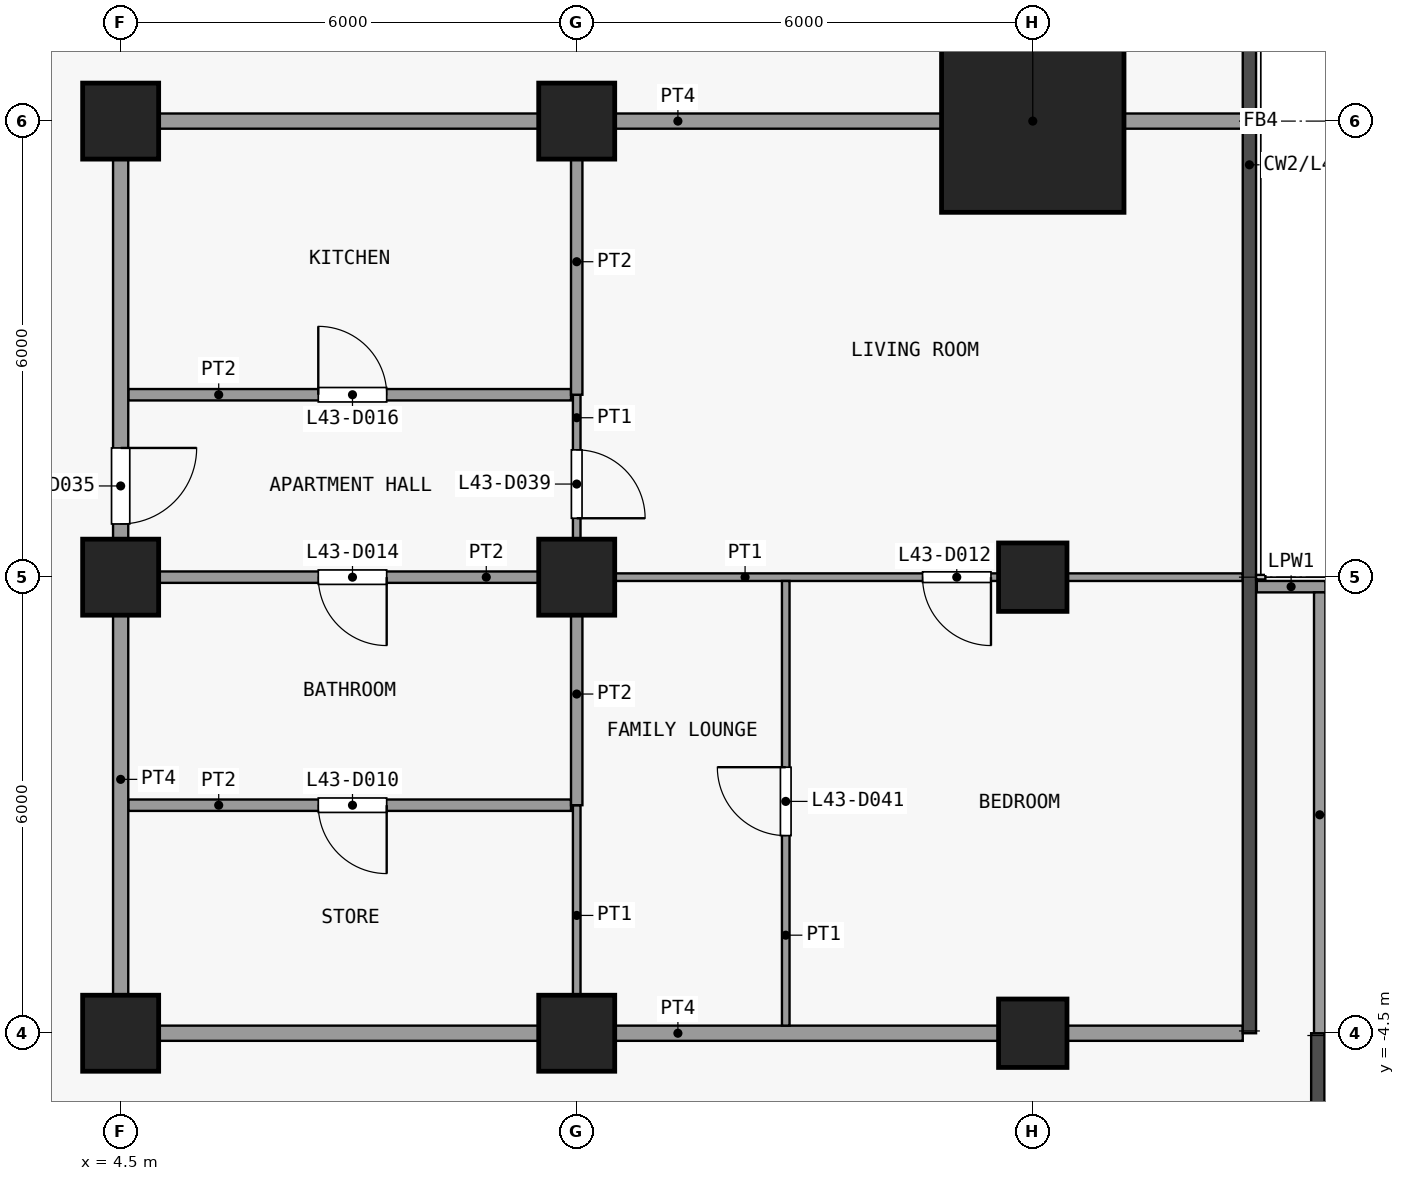
"""IFC4 building model, lengths in metres.
Left out: names, types, materials, properties, quantities, classifications, styles, units other than length and angle.
Written with IfcOpenShell. Run it as: python <this file> out.ifc"""

import sys

from ifc_helpers import new_model, si_unit, direction, frame, frame_2d, origin, origin_2d, place, context, subcontext, project, spatial, rectangle, extrude, element, fill, save


model = new_model("IFC4")
c1 = context("Model", 3, precision=1e-05, world=origin(), true_north=direction((0.0, 1.0)))
c2 = subcontext(c1, "Body", "Model", "MODEL_VIEW")
j1 = project(units=[si_unit("LENGTHUNIT", "METRE"), si_unit("PLANEANGLEUNIT", "RADIAN")], contexts=[c1])
p1 = place(None, origin())
s1 = spatial("IfcSite", under=j1, at=p1, CompositionType="ELEMENT")
p2 = place(p1, origin())
s2 = spatial("IfcBuilding", under=s1, at=p2, CompositionType="ELEMENT")
p3 = place(p2, frame((0.0, 0.0, 174.5)))
s3 = spatial("IfcBuildingStorey", under=s2, at=p3, CompositionType="ELEMENT", Elevation=174.5)
for number, where, z_axis, x_axis in (
    (1, (4.5, -4.5, 0.0), (0.0, 0.0, 1.0), (1.0, 0.0, 0.0)),
    (2, (4.5, 1.5, 0.0), (0.0, 0.0, 1.0), (1.0, 0.0, 0.0)),
    (3, (4.5, 7.5, 0.0), (0.0, 0.0, 1.0), (1.0, 0.0, 0.0)),
    (4, (10.5, -4.5, 0.0), (0.0, 0.0, 1.0), (1.0, 0.0, 0.0)),
    (5, (10.5, 1.5, 0.0), (0.0, 0.0, 1.0), (1.0, 0.0, 0.0)),
    (6, (10.5, 7.5, 0.0), (0.0, 0.0, 1.0), (1.0, 0.0, 0.0)),
):
    element("IfcColumn", number, at=place(p3, frame(where, z_axis=z_axis, x_axis=x_axis)), inside=s3, PredefinedType="COLUMN", context=c2, shape_type="SweptSolid", body=[
        extrude(rectangle(XDim=1.0, YDim=1.0, at=origin_2d()), origin(), (0.0, 0.0, 1.0), 3.6),
    ])
for number, where, z_axis, x_axis in (
    (7, (16.5, -4.5, 0.0), (0.0, 0.0, 1.0), (1.0, 0.0, 0.0)),
    (8, (16.5, 1.5, 0.0), (0.0, 0.0, 1.0), (1.0, 0.0, 0.0)),
):
    element("IfcColumn", number, at=place(p3, frame(where, z_axis=z_axis, x_axis=x_axis)), inside=s3, PredefinedType="COLUMN", context=c2, shape_type="SweptSolid", body=[
        extrude(rectangle(XDim=0.9, YDim=0.9, at=origin_2d()), origin(), (0.0, 0.0, 1.0), 3.6),
    ])
p4 = place(p3, frame((16.5, 7.5, 0.0), z_axis=(0.0, 0.0, 1.0), x_axis=(1.0, 0.0, 0.0)))
e9 = element("IfcColumn", 9, at=p4, inside=s3, PredefinedType="COLUMN", context=c2, shape_type="SweptSolid", body=[
    extrude(rectangle(XDim=2.4, YDim=2.4, at=origin_2d()), origin(), (0.0, 0.0, 1.0), 3.6),
])
p5 = place(p3, frame((19.448, 1.375, 0.0), z_axis=(0.0, 0.0, 1.0), x_axis=(1.0, 0.0, 0.0)))
e10 = element("IfcWall", 10, at=p5, inside=s3, PredefinedType="PARAPET", context=c2, shape_type="SweptSolid", body=[
    extrude(rectangle(XDim=0.903, YDim=0.15, at=frame_2d((0.451, 0.0))), origin(), (0.0, 0.0, 1.0), 1.15),
])
p6 = place(p3, frame((20.275, 1.3, 0.0), z_axis=(0.0, 0.0, 1.0), x_axis=(0.0, -1.0, 0.0)))
e11 = element("IfcWall", 11, at=p6, inside=s3, PredefinedType="PARAPET", context=c2, shape_type="SweptSolid", body=[
    extrude(rectangle(XDim=5.853, YDim=0.15, at=frame_2d((2.926, 0.0))), origin(), (0.0, 0.0, 1.0), 1.15),
])
p7 = place(p3, frame((4.4, -4.5, 0.0), z_axis=(0.0, 0.0, 1.0), x_axis=(1.0, 0.0, 0.0)))
e12 = element("IfcWall", 12, at=p7, inside=s3, PredefinedType="PARTITIONING", context=c2, shape_type="SweptSolid", body=[
    extrude(rectangle(XDim=14.863, YDim=0.2, at=frame_2d((7.431, 0.0))), origin(), (0.0, 0.0, 1.0), 3.3),
])
p8 = place(p3, frame((4.6, -1.5, 0.0), z_axis=(0.0, 0.0, 1.0), x_axis=(1.0, 0.0, 0.0)))
e13 = element("IfcWall", 13, at=p8, inside=s3, PredefinedType="PARTITIONING", context=c2, shape_type="SweptSolid", body=[
    extrude(rectangle(XDim=5.825, YDim=0.15, at=frame_2d((2.913, 0.0))), origin(), (0.0, 0.0, 1.0), 3.3),
])
p9 = place(p8, frame((2.5, 0.0, 0.0)))
e14 = element("IfcOpeningElement", 14, at=p9, cuts=e13, PredefinedType="OPENING", context=c2, shape_type="SweptSolid", body=[
    extrude(rectangle(XDim=0.9, YDim=2.1, at=frame_2d((0.45, 1.05))), frame((0.0, 0.085, 0.0), z_axis=(0.0, -1.0, 0.0), x_axis=(1.0, 0.0, 0.0)), (0.0, 0.0, 1.0), 0.17),
])
p10 = place(p3, frame((10.5, 1.5, 0.0), z_axis=(0.0, 0.0, 1.0), x_axis=(1.0, 0.0, 0.0)))
e15 = element("IfcWall", 15, at=p10, inside=s3, PredefinedType="PARTITIONING", context=c2, shape_type="SweptSolid", body=[
    extrude(rectangle(XDim=8.762, YDim=0.1, at=frame_2d((4.381, 0.0))), origin(), (0.0, 0.0, 1.0), 3.3),
])
p11 = place(p10, frame((4.55, 0.0, 0.0)))
e16 = element("IfcOpeningElement", 16, at=p11, cuts=e15, PredefinedType="OPENING", context=c2, shape_type="SweptSolid", body=[
    extrude(rectangle(XDim=0.9, YDim=2.1, at=frame_2d((0.45, 1.05))), frame((0.0, 0.06, 0.0), z_axis=(0.0, -1.0, 0.0), x_axis=(1.0, 0.0, 0.0)), (0.0, 0.0, 1.0), 0.12),
])
p12 = place(p3, frame((4.6, 1.5, 0.0), z_axis=(0.0, 0.0, 1.0), x_axis=(1.0, 0.0, 0.0)))
e17 = element("IfcWall", 17, at=p12, inside=s3, PredefinedType="PARTITIONING", context=c2, shape_type="SweptSolid", body=[
    extrude(rectangle(XDim=5.9, YDim=0.15, at=frame_2d((2.95, 0.0))), origin(), (0.0, 0.0, 1.0), 3.3),
])
p13 = place(p12, frame((2.5, 0.0, 0.0)))
e18 = element("IfcOpeningElement", 18, at=p13, cuts=e17, PredefinedType="OPENING", context=c2, shape_type="SweptSolid", body=[
    extrude(rectangle(XDim=0.9, YDim=2.1, at=frame_2d((0.45, 1.05))), frame((0.0, 0.085, 0.0), z_axis=(0.0, -1.0, 0.0), x_axis=(1.0, 0.0, 0.0)), (0.0, 0.0, 1.0), 0.17),
])
p14 = place(p3, frame((4.6, 3.9, 0.0), z_axis=(0.0, 0.0, 1.0), x_axis=(1.0, 0.0, 0.0)))
e19 = element("IfcWall", 19, at=p14, inside=s3, PredefinedType="PARTITIONING", context=c2, shape_type="SweptSolid", body=[
    extrude(rectangle(XDim=5.825, YDim=0.15, at=frame_2d((2.913, 0.0))), origin(), (0.0, 0.0, 1.0), 3.3),
])
p15 = place(p14, frame((2.5, 0.0, 0.0)))
e20 = element("IfcOpeningElement", 20, at=p15, cuts=e19, PredefinedType="OPENING", context=c2, shape_type="SweptSolid", body=[
    extrude(rectangle(XDim=0.9, YDim=2.1, at=frame_2d((0.45, 1.05))), frame((0.0, 0.085, 0.0), z_axis=(0.0, -1.0, 0.0), x_axis=(1.0, 0.0, 0.0)), (0.0, 0.0, 1.0), 0.17),
])
p16 = place(p3, frame((4.4, 7.5, 0.0), z_axis=(0.0, 0.0, 1.0), x_axis=(1.0, 0.0, 0.0)))
e21 = element("IfcWall", 21, at=p16, inside=s3, PredefinedType="PARTITIONING", context=c2, shape_type="SweptSolid", body=[
    extrude(rectangle(XDim=14.863, YDim=0.2, at=frame_2d((7.431, 0.0))), origin(), (0.0, 0.0, 1.0), 3.3),
])
p17 = place(p3, frame((4.5, -4.4, 0.0), z_axis=(0.0, 0.0, 1.0), x_axis=(0.0, 1.0, 0.0)))
e22 = element("IfcWall", 22, at=p17, inside=s3, PredefinedType="PARTITIONING", context=c2, shape_type="SweptSolid", body=[
    extrude(rectangle(XDim=11.8, YDim=0.2, at=frame_2d((5.9, 0.0))), origin(), (0.0, 0.0, 1.0), 3.3),
])
p18 = place(p17, frame((6.6, 0.0, 0.0)))
e23 = element("IfcOpeningElement", 23, at=p18, cuts=e22, PredefinedType="OPENING", context=c2, shape_type="SweptSolid", body=[
    extrude(rectangle(XDim=1.0, YDim=2.1, at=frame_2d((0.5, 1.05))), frame((0.0, 0.11, 0.0), z_axis=(0.0, -1.0, 0.0), x_axis=(1.0, 0.0, 0.0)), (0.0, 0.0, 1.0), 0.22),
])
p19 = place(p3, frame((10.5, -4.4, 0.0), z_axis=(0.0, 0.0, 1.0), x_axis=(0.0, 1.0, 0.0)))
e24 = element("IfcWall", 24, at=p19, inside=s3, PredefinedType="PARTITIONING", context=c2, shape_type="SweptSolid", body=[
    extrude(rectangle(XDim=2.9, YDim=0.1, at=frame_2d((1.45, 0.0))), origin(), (0.0, 0.0, 1.0), 3.3),
])
p20 = place(p3, frame((10.5, 1.575, 0.0), z_axis=(0.0, 0.0, 1.0), x_axis=(0.0, 1.0, 0.0)))
e25 = element("IfcWall", 25, at=p20, inside=s3, PredefinedType="PARTITIONING", context=c2, shape_type="SweptSolid", body=[
    extrude(rectangle(XDim=2.325, YDim=0.1, at=frame_2d((1.163, 0.0))), origin(), (0.0, 0.0, 1.0), 3.3),
])
p21 = place(p20, frame((0.7, 0.0, 0.0)))
e26 = element("IfcOpeningElement", 26, at=p21, cuts=e25, PredefinedType="OPENING", context=c2, shape_type="SweptSolid", body=[
    extrude(rectangle(XDim=0.9, YDim=2.1, at=frame_2d((0.45, 1.05))), frame((0.0, 0.06, 0.0), z_axis=(0.0, -1.0, 0.0), x_axis=(1.0, 0.0, 0.0)), (0.0, 0.0, 1.0), 0.12),
])
p22 = place(p3, frame((10.5, -1.5, 0.0), z_axis=(0.0, 0.0, 1.0), x_axis=(0.0, 1.0, 0.0)))
e27 = element("IfcWall", 27, at=p22, inside=s3, PredefinedType="PARTITIONING", context=c2, shape_type="SweptSolid", body=[
    extrude(rectangle(XDim=2.925, YDim=0.15, at=frame_2d((1.462, 0.0))), origin(), (0.0, 0.0, 1.0), 3.3),
])
p23 = place(p3, frame((10.5, 3.9, 0.0), z_axis=(0.0, 0.0, 1.0), x_axis=(0.0, 1.0, 0.0)))
e28 = element("IfcWall", 28, at=p23, inside=s3, PredefinedType="PARTITIONING", context=c2, shape_type="SweptSolid", body=[
    extrude(rectangle(XDim=3.5, YDim=0.15, at=frame_2d((1.75, 0.0))), origin(), (0.0, 0.0, 1.0), 3.3),
])
p24 = place(p3, frame((13.25, -4.4, 0.0), z_axis=(0.0, 0.0, 1.0), x_axis=(0.0, 1.0, 0.0)))
e29 = element("IfcWall", 29, at=p24, inside=s3, PredefinedType="PARTITIONING", context=c2, shape_type="SweptSolid", body=[
    extrude(rectangle(XDim=5.85, YDim=0.1, at=frame_2d((2.925, 0.0))), origin(), (0.0, 0.0, 1.0), 3.3),
])
p25 = place(p24, frame((2.5, 0.0, 0.0)))
e30 = element("IfcOpeningElement", 30, at=p25, cuts=e29, PredefinedType="OPENING", context=c2, shape_type="SweptSolid", body=[
    extrude(rectangle(XDim=0.9, YDim=2.1, at=frame_2d((0.45, 1.05))), frame((0.0, 0.06, 0.0), z_axis=(0.0, -1.0, 0.0), x_axis=(1.0, 0.0, 0.0)), (0.0, 0.0, 1.0), 0.12),
])
p26 = place(p9, origin())
e31 = element("IfcDoor", 31, at=p26, inside=s3, OperationType="SINGLE_SWING_RIGHT", PredefinedType="DOOR", context=c2, shape_type="SweptSolid", body=[
    extrude(rectangle(XDim=0.9, YDim=2.1, at=frame_2d((0.45, 1.05))), frame((0.0, 0.025, 0.0), z_axis=(0.0, -1.0, 0.0), x_axis=(1.0, 0.0, 0.0)), (0.0, 0.0, 1.0), 0.05),
])
fill(e14, e31)
p27 = place(p11, origin())
e32 = element("IfcDoor", 32, at=p27, inside=s3, OperationType="SINGLE_SWING_RIGHT", PredefinedType="DOOR", context=c2, shape_type="SweptSolid", body=[
    extrude(rectangle(XDim=0.9, YDim=2.1, at=frame_2d((0.45, 1.05))), frame((0.0, 0.025, 0.0), z_axis=(0.0, -1.0, 0.0), x_axis=(1.0, 0.0, 0.0)), (0.0, 0.0, 1.0), 0.05),
])
fill(e16, e32)
p28 = place(p13, origin())
e33 = element("IfcDoor", 33, at=p28, inside=s3, OperationType="SINGLE_SWING_RIGHT", PredefinedType="DOOR", context=c2, shape_type="SweptSolid", body=[
    extrude(rectangle(XDim=0.9, YDim=2.1, at=frame_2d((0.45, 1.05))), frame((0.0, 0.025, 0.0), z_axis=(0.0, -1.0, 0.0), x_axis=(1.0, 0.0, 0.0)), (0.0, 0.0, 1.0), 0.05),
])
fill(e18, e33)
p29 = place(p15, origin())
e34 = element("IfcDoor", 34, at=p29, inside=s3, OperationType="SINGLE_SWING_RIGHT", PredefinedType="DOOR", context=c2, shape_type="SweptSolid", body=[
    extrude(rectangle(XDim=0.9, YDim=2.1, at=frame_2d((0.45, 1.05))), frame((0.0, 0.025, 0.0), z_axis=(0.0, -1.0, 0.0), x_axis=(1.0, 0.0, 0.0)), (0.0, 0.0, 1.0), 0.05),
])
fill(e20, e34)
p30 = place(p18, origin())
e35 = element("IfcDoor", 35, at=p30, inside=s3, OperationType="SINGLE_SWING_RIGHT", PredefinedType="DOOR", context=c2, shape_type="SweptSolid", body=[
    extrude(rectangle(XDim=1.0, YDim=2.1, at=frame_2d((0.5, 1.05))), frame((0.0, 0.025, 0.0), z_axis=(0.0, -1.0, 0.0), x_axis=(1.0, 0.0, 0.0)), (0.0, 0.0, 1.0), 0.05),
])
fill(e23, e35)
p31 = place(p21, origin())
e36 = element("IfcDoor", 36, at=p31, inside=s3, OperationType="SINGLE_SWING_LEFT", PredefinedType="DOOR", context=c2, shape_type="SweptSolid", body=[
    extrude(rectangle(XDim=0.9, YDim=2.1, at=frame_2d((0.45, 1.05))), frame((0.0, 0.025, 0.0), z_axis=(0.0, -1.0, 0.0), x_axis=(1.0, 0.0, 0.0)), (0.0, 0.0, 1.0), 0.05),
])
fill(e26, e36)
p32 = place(p25, origin())
e37 = element("IfcDoor", 37, at=p32, inside=s3, OperationType="SINGLE_SWING_LEFT", PredefinedType="DOOR", context=c2, shape_type="SweptSolid", body=[
    extrude(rectangle(XDim=0.9, YDim=2.1, at=frame_2d((0.45, 1.05))), frame((0.0, 0.025, 0.0), z_axis=(0.0, -1.0, 0.0), x_axis=(1.0, 0.0, 0.0)), (0.0, 0.0, 1.0), 0.05),
])
fill(e30, e37)
save(model, sys.argv[1])
